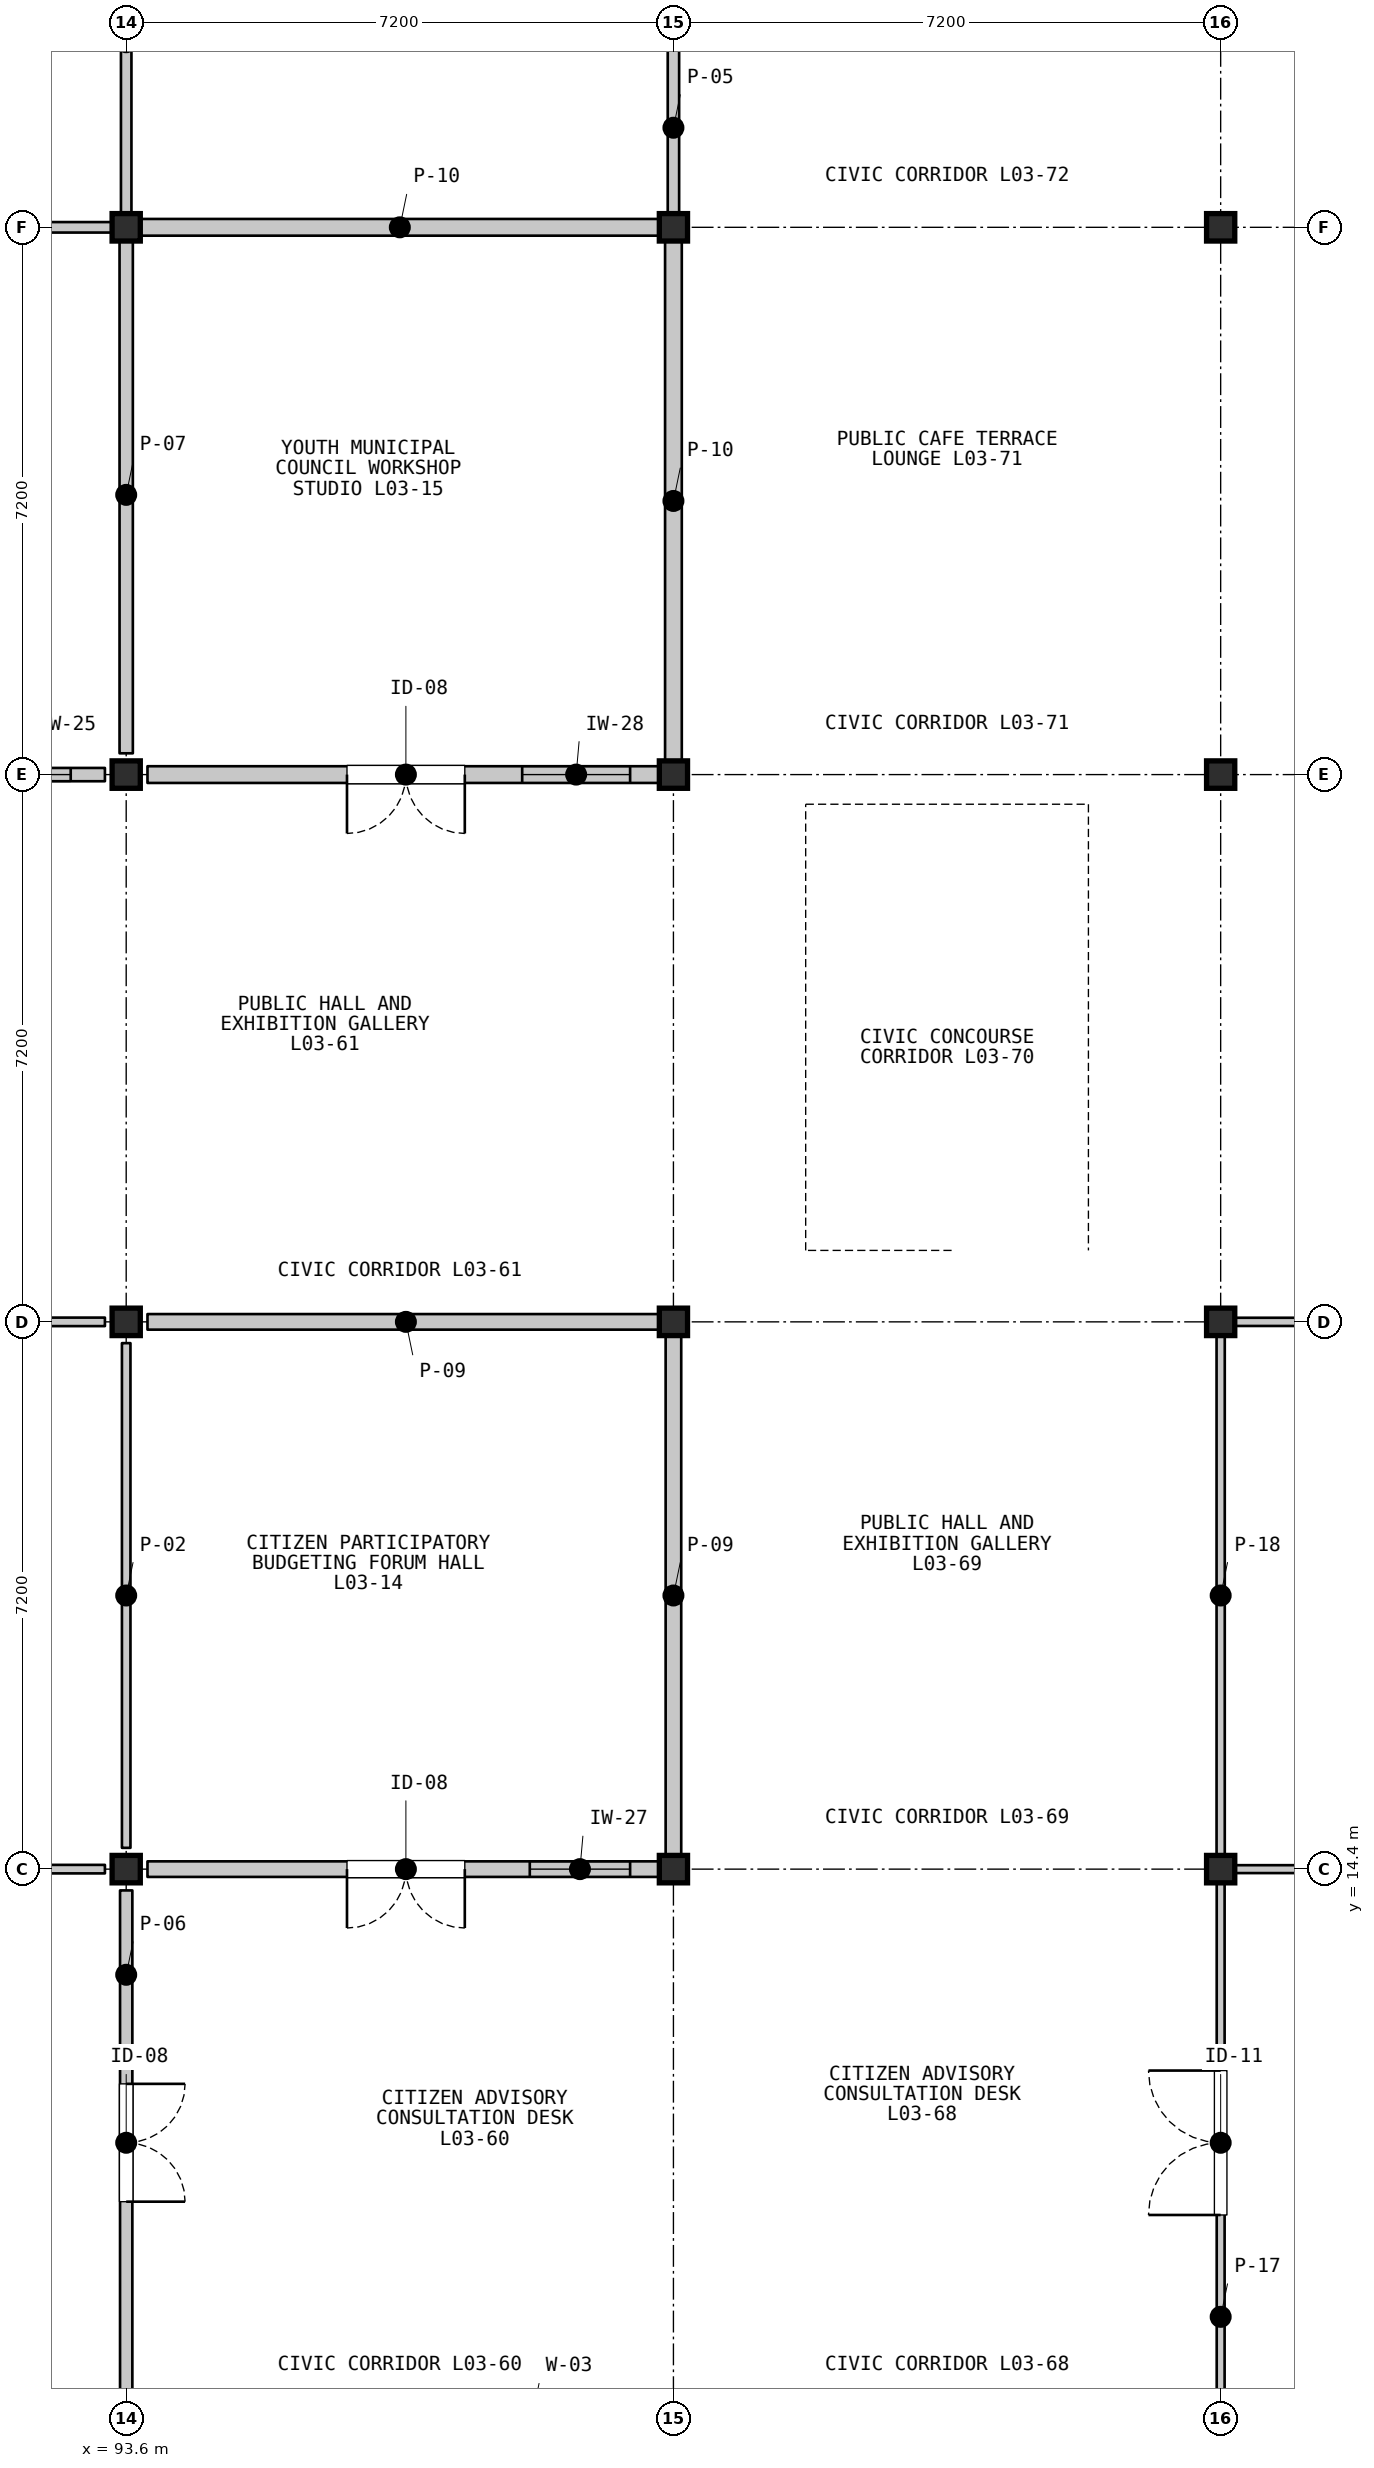
"""IFC4 building model, lengths in metres.
Left out: names, types, materials, properties, quantities, classifications, styles, units other than length and angle.
Written with IfcOpenShell. Run it as: python <this file> out.ifc"""

import sys

from ifc_helpers import new_model, si_unit, direction, frame, frame_2d, origin, origin_2d, place, context, subcontext, project, spatial, rectangle, i_section, extrude, element, fill, save


model = new_model("IFC4")
c1 = context("Model", 3, precision=1e-05, world=origin(), true_north=direction((0.0, 1.0)))
c2 = subcontext(c1, "Body", "Model", "MODEL_VIEW")
j1 = project(units=[si_unit("LENGTHUNIT", "METRE"), si_unit("PLANEANGLEUNIT", "RADIAN")], contexts=[c1])
p1 = place(None, origin())
s1 = spatial("IfcSite", under=j1, at=p1, CompositionType="ELEMENT")
p2 = place(p1, origin())
s2 = spatial("IfcBuilding", under=s1, at=p2, CompositionType="ELEMENT")
p3 = place(p2, frame((0.0, 0.0, 9.9)))
s3 = spatial("IfcBuildingStorey", under=s2, at=p3, CompositionType="ELEMENT", Elevation=9.9)
for number, where, z_axis, x_axis in (
    (1, (93.6, 14.4, 0.0), (0.0, 0.0, 1.0), (1.0, 0.0, 0.0)),
    (2, (93.6, 21.6, 0.0), (0.0, 0.0, 1.0), (1.0, 0.0, 0.0)),
    (3, (93.6, 28.8, 0.0), (0.0, 0.0, 1.0), (1.0, 0.0, 0.0)),
    (4, (93.6, 36.0, 0.0), (0.0, 0.0, 1.0), (1.0, 0.0, 0.0)),
    (5, (100.8, 14.4, 0.0), (0.0, 0.0, 1.0), (1.0, 0.0, 0.0)),
    (6, (100.8, 21.6, 0.0), (0.0, 0.0, 1.0), (1.0, 0.0, 0.0)),
    (7, (100.8, 28.8, 0.0), (0.0, 0.0, 1.0), (1.0, 0.0, 0.0)),
    (8, (100.8, 36.0, 0.0), (0.0, 0.0, 1.0), (1.0, 0.0, 0.0)),
    (9, (108.0, 14.4, 0.0), (0.0, 0.0, 1.0), (1.0, 0.0, 0.0)),
    (10, (108.0, 21.6, 0.0), (0.0, 0.0, 1.0), (1.0, 0.0, 0.0)),
    (11, (108.0, 28.8, 0.0), (0.0, 0.0, 1.0), (1.0, 0.0, 0.0)),
    (12, (108.0, 36.0, 0.0), (0.0, 0.0, 1.0), (1.0, 0.0, 0.0)),
):
    element("IfcColumn", number, at=place(p3, frame(where, z_axis=z_axis, x_axis=x_axis)), inside=s3, PredefinedType="COLUMN", context=c2, shape_type="SweptSolid", body=[
        extrude(i_section(OverallWidth=0.371, OverallDepth=0.361, WebThickness=0.012, FlangeThickness=0.02, FilletRadius=0.015, at=origin_2d()), origin(), (0.0, 0.0, 1.0), 4.2),
    ])
for number, where, z_axis, x_axis in (
    (13, (93.32, 14.4, 0.0), (0.0, 0.0, 1.0), (-1.0, 0.0, 0.0)),
    (14, (86.68, 21.6, 0.0), (0.0, 0.0, 1.0), (1.0, 0.0, 0.0)),
):
    element("IfcWall", number, at=place(p3, frame(where, z_axis=z_axis, x_axis=x_axis)), inside=s3, PredefinedType="PARTITIONING", context=c2, shape_type="SweptSolid", body=[
        extrude(rectangle(XDim=6.64, YDim=0.112, at=frame_2d((3.32, 0.0))), origin(), (0.0, 0.0, 1.0), 3.408),
    ])
p4 = place(p3, frame((93.6, 21.32, 0.0), z_axis=(0.0, 0.0, 1.0), x_axis=(0.0, -1.0, 0.0)))
e15 = element("IfcWall", 15, at=p4, inside=s3, PredefinedType="PARTITIONING", context=c2, shape_type="SweptSolid", body=[
    extrude(rectangle(XDim=6.64, YDim=0.112, at=frame_2d((3.32, 0.0))), origin(), (0.0, 0.0, 1.0), 3.477),
])
p5 = place(p3, frame((93.48, 36.0, 0.0), z_axis=(0.0, 0.0, 1.0), x_axis=(-1.0, 0.0, 0.0)))
e16 = element("IfcWall", 16, at=p5, inside=s3, PredefinedType="PARTITIONING", context=c2, shape_type="SweptSolid", body=[
    extrude(rectangle(XDim=6.96, YDim=0.138, at=frame_2d((3.48, 0.0))), origin(), (0.0, 0.0, 1.0), 3.408),
])
p6 = place(p3, frame((93.6, 42.92, 0.0), z_axis=(0.0, 0.0, 1.0), x_axis=(0.0, -1.0, 0.0)))
e17 = element("IfcWall", 17, at=p6, inside=s3, PredefinedType="PARTITIONING", context=c2, shape_type="SweptSolid", body=[
    extrude(rectangle(XDim=6.8, YDim=0.138, at=frame_2d((3.4, 0.0))), origin(), (0.0, 0.0, 1.0), 3.408),
])
p7 = place(p3, frame((93.6, 14.12, 0.0), z_axis=(0.0, 0.0, 1.0), x_axis=(0.0, -1.0, 0.0)))
e18 = element("IfcWall", 18, at=p7, inside=s3, PredefinedType="PARTITIONING", context=c2, shape_type="SweptSolid", body=[
    extrude(rectangle(XDim=6.64, YDim=0.162, at=frame_2d((3.32, 0.0))), origin(), (0.0, 0.0, 1.0), 3.477),
])
p8 = place(p7, frame((2.545, 0.0, 0.0)))
e19 = element("IfcOpeningElement", 19, at=p8, cuts=e18, PredefinedType="OPENING", context=c2, shape_type="SweptSolid", body=[
    extrude(rectangle(XDim=1.55, YDim=2.3, at=frame_2d((0.775, 1.15))), frame((0.0, 0.091, 0.0), z_axis=(0.0, -1.0, 0.0), x_axis=(1.0, 0.0, 0.0)), (0.0, 0.0, 1.0), 0.182),
])
p9 = place(p3, frame((93.32, 28.8, 0.0), z_axis=(0.0, 0.0, 1.0), x_axis=(-1.0, 0.0, 0.0)))
e20 = element("IfcWall", 20, at=p9, inside=s3, PredefinedType="PARTITIONING", context=c2, shape_type="SweptSolid", body=[
    extrude(rectangle(XDim=6.64, YDim=0.175, at=frame_2d((3.32, 0.0))), origin(), (0.0, 0.0, 1.0), 3.408),
])
p10 = place(p9, frame((2.395, 0.0, 0.0)))
e21 = element("IfcOpeningElement", 21, at=p10, cuts=e20, PredefinedType="OPENING", context=c2, shape_type="SweptSolid", body=[
    extrude(rectangle(XDim=1.85, YDim=2.45, at=frame_2d((0.925, 1.225))), frame((0.0, 0.097, 0.0), z_axis=(0.0, -1.0, 0.0), x_axis=(1.0, 0.0, 0.0)), (0.0, 0.0, 1.0), 0.195),
])
p11 = place(p9, frame((0.45, 0.0, 1.05)))
e22 = element("IfcOpeningElement", 22, at=p11, cuts=e20, PredefinedType="OPENING", context=c2, shape_type="SweptSolid", body=[
    extrude(rectangle(XDim=1.12, YDim=0.92, at=frame_2d((0.56, 0.46))), frame((0.0, 0.097, 0.0), z_axis=(0.0, -1.0, 0.0), x_axis=(1.0, 0.0, 0.0)), (0.0, 0.0, 1.0), 0.195),
])
p12 = place(p3, frame((93.6, 35.88, 0.0), z_axis=(0.0, 0.0, 1.0), x_axis=(0.0, -1.0, 0.0)))
e23 = element("IfcWall", 23, at=p12, inside=s3, PredefinedType="PARTITIONING", context=c2, shape_type="SweptSolid", body=[
    extrude(rectangle(XDim=6.8, YDim=0.175, at=frame_2d((3.4, 0.0))), origin(), (0.0, 0.0, 1.0), 3.408),
])
p13 = place(p3, frame((100.68, 14.4, 0.0), z_axis=(0.0, 0.0, 1.0), x_axis=(-1.0, 0.0, 0.0)))
e24 = element("IfcWall", 24, at=p13, inside=s3, PredefinedType="PARTITIONING", context=c2, shape_type="SweptSolid", body=[
    extrude(rectangle(XDim=6.8, YDim=0.205, at=frame_2d((3.4, 0.0))), origin(), (0.0, 0.0, 1.0), 3.408),
])
p14 = place(p13, frame((2.625, 0.0, 0.0)))
e25 = element("IfcOpeningElement", 25, at=p14, cuts=e24, PredefinedType="OPENING", context=c2, shape_type="SweptSolid", body=[
    extrude(rectangle(XDim=1.55, YDim=2.3, at=frame_2d((0.775, 1.15))), frame((0.0, 0.113, 0.0), z_axis=(0.0, -1.0, 0.0), x_axis=(1.0, 0.0, 0.0)), (0.0, 0.0, 1.0), 0.225),
])
p15 = place(p13, frame((0.45, 0.0, 1.05)))
e26 = element("IfcOpeningElement", 26, at=p15, cuts=e24, PredefinedType="OPENING", context=c2, shape_type="SweptSolid", body=[
    extrude(rectangle(XDim=1.32, YDim=0.92, at=frame_2d((0.66, 0.46))), frame((0.0, 0.113, 0.0), z_axis=(0.0, -1.0, 0.0), x_axis=(1.0, 0.0, 0.0)), (0.0, 0.0, 1.0), 0.225),
])
p16 = place(p3, frame((93.88, 21.6, 0.0), z_axis=(0.0, 0.0, 1.0), x_axis=(1.0, 0.0, 0.0)))
e27 = element("IfcWall", 27, at=p16, inside=s3, PredefinedType="PARTITIONING", context=c2, shape_type="SweptSolid", body=[
    extrude(rectangle(XDim=6.8, YDim=0.205, at=frame_2d((3.4, 0.0))), origin(), (0.0, 0.0, 1.0), 3.408),
])
p17 = place(p3, frame((100.8, 21.48, 0.0), z_axis=(0.0, 0.0, 1.0), x_axis=(0.0, -1.0, 0.0)))
e28 = element("IfcWall", 28, at=p17, inside=s3, PredefinedType="PARTITIONING", context=c2, shape_type="SweptSolid", body=[
    extrude(rectangle(XDim=6.96, YDim=0.205, at=frame_2d((3.48, 0.0))), origin(), (0.0, 0.0, 1.0), 3.408),
])
p18 = place(p3, frame((100.68, 28.8, 0.0), z_axis=(0.0, 0.0, 1.0), x_axis=(-1.0, 0.0, 0.0)))
e29 = element("IfcWall", 29, at=p18, inside=s3, PredefinedType="PARTITIONING", context=c2, shape_type="SweptSolid", body=[
    extrude(rectangle(XDim=6.8, YDim=0.22, at=frame_2d((3.4, 0.0))), origin(), (0.0, 0.0, 1.0), 3.408),
])
p19 = place(p18, frame((2.625, 0.0, 0.0)))
e30 = element("IfcOpeningElement", 30, at=p19, cuts=e29, PredefinedType="OPENING", context=c2, shape_type="SweptSolid", body=[
    extrude(rectangle(XDim=1.55, YDim=2.3, at=frame_2d((0.775, 1.15))), frame((0.0, 0.12, 0.0), z_axis=(0.0, -1.0, 0.0), x_axis=(1.0, 0.0, 0.0)), (0.0, 0.0, 1.0), 0.24),
])
p20 = place(p18, frame((0.45, 0.0, 1.05)))
e31 = element("IfcOpeningElement", 31, at=p20, cuts=e29, PredefinedType="OPENING", context=c2, shape_type="SweptSolid", body=[
    extrude(rectangle(XDim=1.42, YDim=0.96, at=frame_2d((0.71, 0.48))), frame((0.0, 0.12, 0.0), z_axis=(0.0, -1.0, 0.0), x_axis=(1.0, 0.0, 0.0)), (0.0, 0.0, 1.0), 0.24),
])
for number, where, z_axis, x_axis in (
    (32, (93.72, 36.0, 0.0), (0.0, 0.0, 1.0), (1.0, 0.0, 0.0)),
    (33, (100.8, 35.88, 0.0), (0.0, 0.0, 1.0), (0.0, -1.0, 0.0)),
):
    element("IfcWall", number, at=place(p3, frame(where, z_axis=z_axis, x_axis=x_axis)), inside=s3, PredefinedType="PARTITIONING", context=c2, shape_type="SweptSolid", body=[
        extrude(rectangle(XDim=6.96, YDim=0.22, at=frame_2d((3.48, 0.0))), origin(), (0.0, 0.0, 1.0), 3.408),
    ])
p21 = place(p3, frame((100.8, 43.08, 0.0), z_axis=(0.0, 0.0, 1.0), x_axis=(0.0, -1.0, 0.0)))
e34 = element("IfcWall", 34, at=p21, inside=s3, PredefinedType="PARTITIONING", context=c2, shape_type="SweptSolid", body=[
    extrude(rectangle(XDim=6.96, YDim=0.15, at=frame_2d((3.48, 0.0))), origin(), (0.0, 0.0, 1.0), 3.408),
])
p22 = place(p21, frame((2.555, 0.0, 0.0)))
e35 = element("IfcOpeningElement", 35, at=p22, cuts=e34, PredefinedType="OPENING", context=c2, shape_type="SweptSolid", body=[
    extrude(rectangle(XDim=1.85, YDim=2.45, at=frame_2d((0.925, 1.225))), frame((0.0, 0.085, 0.0), z_axis=(0.0, -1.0, 0.0), x_axis=(1.0, 0.0, 0.0)), (0.0, 0.0, 1.0), 0.17),
])
p23 = place(p21, frame((0.45, 0.0, 1.05)))
e36 = element("IfcOpeningElement", 36, at=p23, cuts=e34, PredefinedType="OPENING", context=c2, shape_type="SweptSolid", body=[
    extrude(rectangle(XDim=1.52, YDim=0.96, at=frame_2d((0.76, 0.48))), frame((0.0, 0.085, 0.0), z_axis=(0.0, -1.0, 0.0), x_axis=(1.0, 0.0, 0.0)), (0.0, 0.0, 1.0), 0.17),
])
p24 = place(p3, frame((108.0, 7.32, 0.0), z_axis=(0.0, 0.0, 1.0), x_axis=(0.0, 1.0, 0.0)))
e37 = element("IfcWall", 37, at=p24, inside=s3, PredefinedType="PARTITIONING", context=c2, shape_type="SweptSolid", body=[
    extrude(rectangle(XDim=6.96, YDim=0.104, at=frame_2d((3.48, 0.0))), origin(), (0.0, 0.0, 1.0), 3.408),
])
p25 = place(p24, frame((2.53, 0.0, 0.0)))
e38 = element("IfcOpeningElement", 38, at=p25, cuts=e37, PredefinedType="OPENING", context=c2, shape_type="SweptSolid", body=[
    extrude(rectangle(XDim=1.9, YDim=2.45, at=frame_2d((0.95, 1.225))), frame((0.0, 0.062, 0.0), z_axis=(0.0, -1.0, 0.0), x_axis=(1.0, 0.0, 0.0)), (0.0, 0.0, 1.0), 0.124),
])
p26 = place(p3, frame((108.12, 14.4, 0.0), z_axis=(0.0, 0.0, 1.0), x_axis=(1.0, 0.0, 0.0)))
e39 = element("IfcWall", 39, at=p26, inside=s3, PredefinedType="PARTITIONING", context=c2, shape_type="SweptSolid", body=[
    extrude(rectangle(XDim=6.8, YDim=0.104, at=frame_2d((3.4, 0.0))), origin(), (0.0, 0.0, 1.0), 3.408),
])
p27 = place(p3, frame((108.12, 21.6, 0.0), z_axis=(0.0, 0.0, 1.0), x_axis=(1.0, 0.0, 0.0)))
e40 = element("IfcWall", 40, at=p27, inside=s3, PredefinedType="PARTITIONING", context=c2, shape_type="SweptSolid", body=[
    extrude(rectangle(XDim=6.8, YDim=0.108, at=frame_2d((3.4, 0.0))), origin(), (0.0, 0.0, 1.0), 3.408),
])
p28 = place(p27, frame((2.625, 0.0, 0.0)))
e41 = element("IfcOpeningElement", 41, at=p28, cuts=e40, PredefinedType="OPENING", context=c2, shape_type="SweptSolid", body=[
    extrude(rectangle(XDim=1.55, YDim=2.3, at=frame_2d((0.775, 1.15))), frame((0.0, 0.064, 0.0), z_axis=(0.0, -1.0, 0.0), x_axis=(1.0, 0.0, 0.0)), (0.0, 0.0, 1.0), 0.128),
])
p29 = place(p3, frame((108.0, 14.52, 0.0), z_axis=(0.0, 0.0, 1.0), x_axis=(0.0, 1.0, 0.0)))
e42 = element("IfcWall", 42, at=p29, inside=s3, PredefinedType="PARTITIONING", context=c2, shape_type="SweptSolid", body=[
    extrude(rectangle(XDim=6.96, YDim=0.108, at=frame_2d((3.48, 0.0))), origin(), (0.0, 0.0, 1.0), 3.408),
])
p30 = place(p8, origin())
e43 = element("IfcDoor", 43, at=p30, inside=s3, OperationType="DOUBLE_DOOR_SINGLE_SWING", PredefinedType="DOOR", context=c2, shape_type="SweptSolid", body=[
    extrude(rectangle(XDim=1.55, YDim=2.3, at=frame_2d((0.775, 1.15))), frame((0.0, 0.025, 0.0), z_axis=(0.0, -1.0, 0.0), x_axis=(1.0, 0.0, 0.0)), (0.0, 0.0, 1.0), 0.05),
])
fill(e19, e43)
p31 = place(p11, origin())
e44 = element("IfcWindow", 44, at=p31, inside=s3, PartitioningType="SINGLE_PANEL", PredefinedType="WINDOW", context=c2, shape_type="SweptSolid", body=[
    extrude(rectangle(XDim=1.12, YDim=0.92, at=frame_2d((0.56, 0.46))), frame((0.0, 0.03, 0.0), z_axis=(0.0, -1.0, 0.0), x_axis=(1.0, 0.0, 0.0)), (0.0, 0.0, 1.0), 0.06),
])
fill(e22, e44)
p32 = place(p14, origin())
e45 = element("IfcDoor", 45, at=p32, inside=s3, OperationType="DOUBLE_DOOR_SINGLE_SWING", PredefinedType="DOOR", context=c2, shape_type="SweptSolid", body=[
    extrude(rectangle(XDim=1.55, YDim=2.3, at=frame_2d((0.775, 1.15))), frame((0.0, 0.025, 0.0), z_axis=(0.0, -1.0, 0.0), x_axis=(1.0, 0.0, 0.0)), (0.0, 0.0, 1.0), 0.05),
])
fill(e25, e45)
p33 = place(p15, origin())
e46 = element("IfcWindow", 46, at=p33, inside=s3, PartitioningType="SINGLE_PANEL", PredefinedType="WINDOW", context=c2, shape_type="SweptSolid", body=[
    extrude(rectangle(XDim=1.32, YDim=0.92, at=frame_2d((0.66, 0.46))), frame((0.0, 0.03, 0.0), z_axis=(0.0, -1.0, 0.0), x_axis=(1.0, 0.0, 0.0)), (0.0, 0.0, 1.0), 0.06),
])
fill(e26, e46)
p34 = place(p19, origin())
e47 = element("IfcDoor", 47, at=p34, inside=s3, OperationType="DOUBLE_DOOR_SINGLE_SWING", PredefinedType="DOOR", context=c2, shape_type="SweptSolid", body=[
    extrude(rectangle(XDim=1.55, YDim=2.3, at=frame_2d((0.775, 1.15))), frame((0.0, 0.025, 0.0), z_axis=(0.0, -1.0, 0.0), x_axis=(1.0, 0.0, 0.0)), (0.0, 0.0, 1.0), 0.05),
])
fill(e30, e47)
p35 = place(p20, origin())
e48 = element("IfcWindow", 48, at=p35, inside=s3, PartitioningType="SINGLE_PANEL", PredefinedType="WINDOW", context=c2, shape_type="SweptSolid", body=[
    extrude(rectangle(XDim=1.42, YDim=0.96, at=frame_2d((0.71, 0.48))), frame((0.0, 0.03, 0.0), z_axis=(0.0, -1.0, 0.0), x_axis=(1.0, 0.0, 0.0)), (0.0, 0.0, 1.0), 0.06),
])
fill(e31, e48)
p36 = place(p25, origin())
e49 = element("IfcDoor", 49, at=p36, inside=s3, OperationType="DOUBLE_DOOR_SINGLE_SWING", PredefinedType="DOOR", context=c2, shape_type="SweptSolid", body=[
    extrude(rectangle(XDim=1.9, YDim=2.45, at=frame_2d((0.95, 1.225))), frame((0.0, 0.025, 0.0), z_axis=(0.0, -1.0, 0.0), x_axis=(1.0, 0.0, 0.0)), (0.0, 0.0, 1.0), 0.05),
])
fill(e38, e49)
save(model, sys.argv[1])
